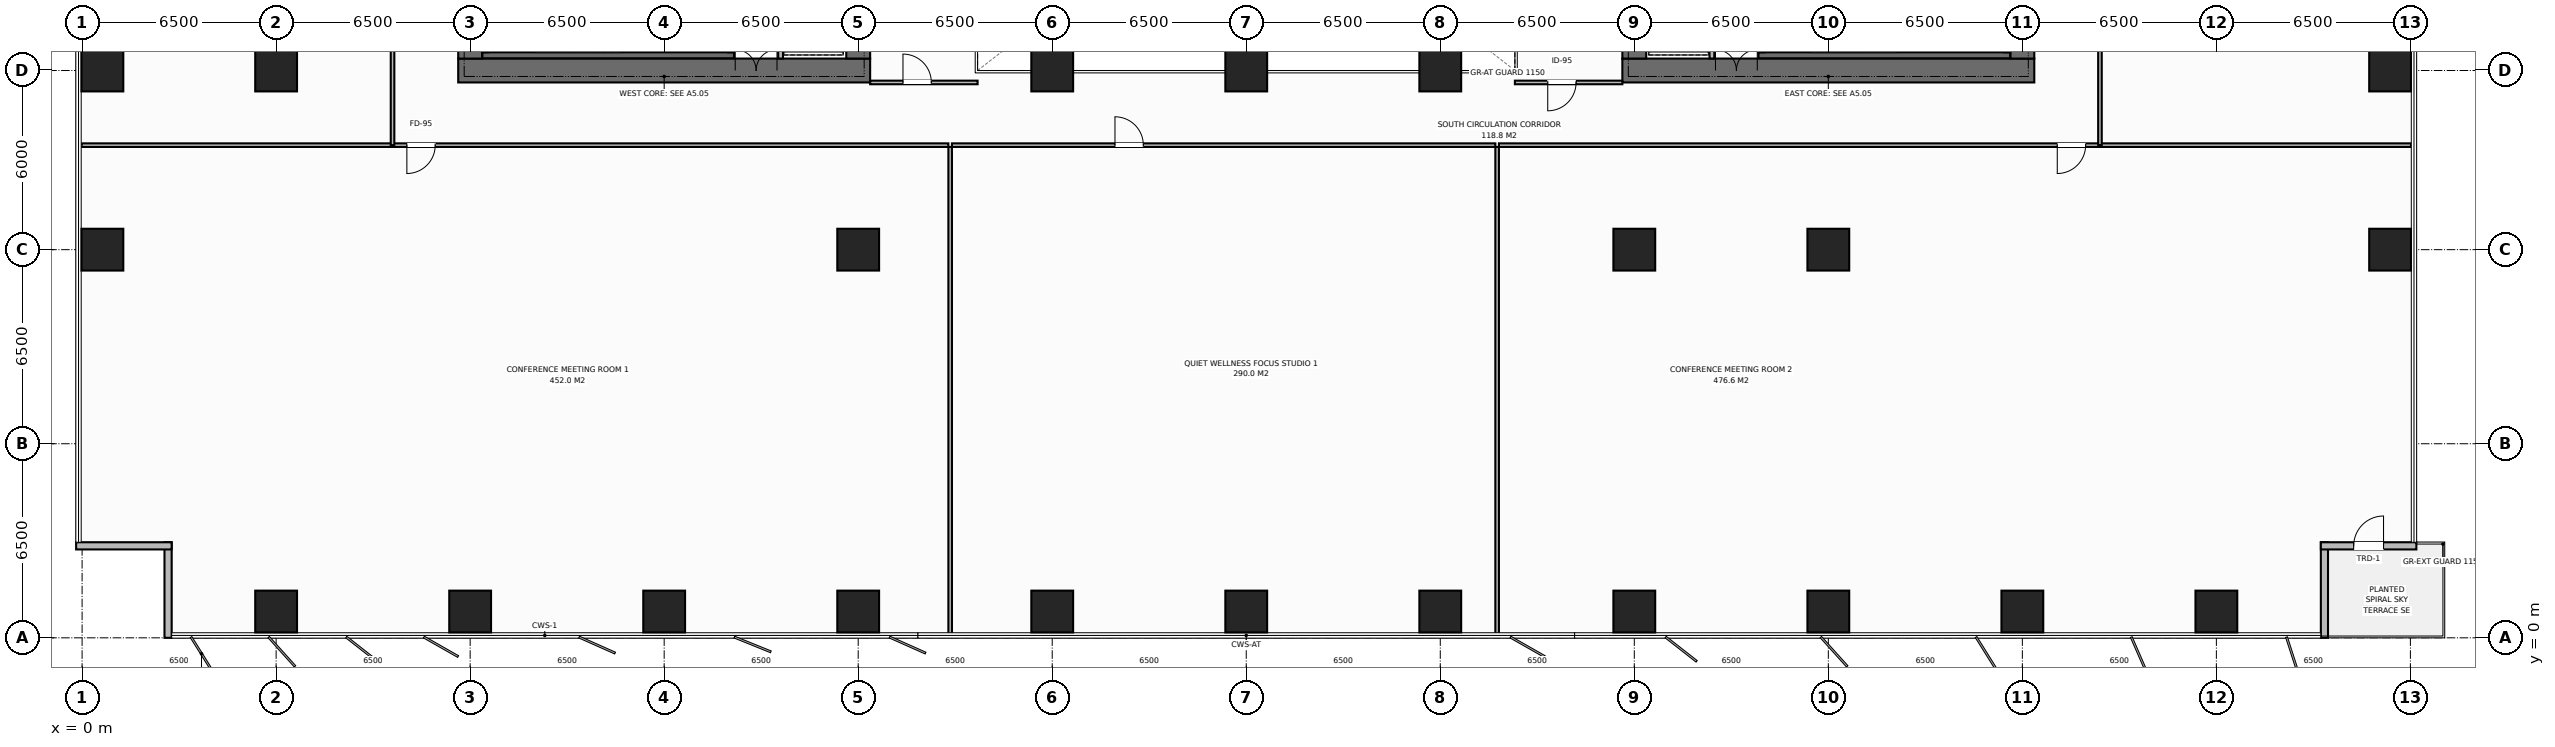
"""IFC4 building model, lengths in metres.
Left out: names, types, materials, properties, quantities, classifications, styles, units other than length and angle.
Written with IfcOpenShell. Run it as: python <this file> out.ifc"""

import sys

from ifc_helpers import new_model, si_unit, direction, frame, frame_2d, origin, origin_2d, place, context, subcontext, project, spatial, rectangle, extrude, element, fill, save


model = new_model("IFC4")
c1 = context("Model", 3, precision=1e-05, world=origin(), true_north=direction((0.0, 1.0)))
c2 = subcontext(c1, "Body", "Model", "MODEL_VIEW")
j1 = project(units=[si_unit("LENGTHUNIT", "METRE"), si_unit("PLANEANGLEUNIT", "RADIAN")], contexts=[c1])
p1 = place(None, origin())
s1 = spatial("IfcSite", under=j1, at=p1, CompositionType="ELEMENT")
p2 = place(p1, origin())
s2 = spatial("IfcBuilding", under=s1, at=p2, CompositionType="ELEMENT")
p3 = place(p2, frame((0.0, 0.0, 50.6)))
s3 = spatial("IfcBuildingStorey", under=s2, at=p3, CompositionType="ELEMENT", Elevation=50.6)
p4 = place(p3, frame((12.6, 19.0, 0.0), z_axis=(0.0, 0.0, 1.0), x_axis=(1.0, 0.0, 0.0)))
e1 = element("IfcWall", 1, at=p4, inside=s3, PredefinedType="SHEAR", context=c2, shape_type="SweptSolid", body=[
    extrude(rectangle(XDim=13.8, YDim=0.8, at=frame_2d((6.9, 0.0))), origin(), (0.0, 0.0, 1.0), 3.8),
])
p5 = place(p4, frame((9.28, 0.0, 0.0)))
e2 = element("IfcOpeningElement", 2, at=p5, cuts=e1, PredefinedType="OPENING", context=c2, shape_type="SweptSolid", body=[
    extrude(rectangle(XDim=1.4, YDim=2.2, at=frame_2d((0.7, 1.1))), frame((0.0, 0.41, 0.0), z_axis=(0.0, -1.0, 0.0), x_axis=(1.0, 0.0, 0.0)), (0.0, 0.0, 1.0), 0.82),
])
p6 = place(p3, frame((13.0, 19.4, 0.0), z_axis=(0.0, 0.0, 1.0), x_axis=(0.0, 1.0, 0.0)))
e3 = element("IfcWall", 3, at=p6, inside=s3, PredefinedType="SHEAR", context=c2, shape_type="SweptSolid", body=[
    extrude(rectangle(XDim=13.2, YDim=0.8, at=frame_2d((6.6, 0.0))), origin(), (0.0, 0.0, 1.0), 3.8),
])
p7 = place(p6, frame((4.65, 0.0, 0.0)))
e4 = element("IfcOpeningElement", 4, at=p7, cuts=e3, PredefinedType="OPENING", context=c2, shape_type="SweptSolid", body=[
    extrude(rectangle(XDim=1.4, YDim=2.2, at=frame_2d((0.7, 1.1))), frame((0.0, 0.41, 0.0), z_axis=(0.0, -1.0, 0.0), x_axis=(1.0, 0.0, 0.0)), (0.0, 0.0, 1.0), 0.82),
])
p8 = place(p3, frame((26.0, 19.4, 0.0), z_axis=(0.0, 0.0, 1.0), x_axis=(0.0, 1.0, 0.0)))
e5 = element("IfcWall", 5, at=p8, inside=s3, PredefinedType="SHEAR", context=c2, shape_type="SweptSolid", body=[
    extrude(rectangle(XDim=13.2, YDim=0.8, at=frame_2d((6.6, 0.0))), origin(), (0.0, 0.0, 1.0), 3.8),
])
p9 = place(p3, frame((51.6, 19.0, 0.0), z_axis=(0.0, 0.0, 1.0), x_axis=(1.0, 0.0, 0.0)))
e6 = element("IfcWall", 6, at=p9, inside=s3, PredefinedType="SHEAR", context=c2, shape_type="SweptSolid", body=[
    extrude(rectangle(XDim=13.8, YDim=0.8, at=frame_2d((6.9, 0.0))), origin(), (0.0, 0.0, 1.0), 3.8),
])
p10 = place(p9, frame((3.12, 0.0, 0.0)))
e7 = element("IfcOpeningElement", 7, at=p10, cuts=e6, PredefinedType="OPENING", context=c2, shape_type="SweptSolid", body=[
    extrude(rectangle(XDim=1.4, YDim=2.2, at=frame_2d((0.7, 1.1))), frame((0.0, 0.41, 0.0), z_axis=(0.0, -1.0, 0.0), x_axis=(1.0, 0.0, 0.0)), (0.0, 0.0, 1.0), 0.82),
])
p11 = place(p3, frame((52.0, 19.4, 0.0), z_axis=(0.0, 0.0, 1.0), x_axis=(0.0, 1.0, 0.0)))
e8 = element("IfcWall", 8, at=p11, inside=s3, PredefinedType="SHEAR", context=c2, shape_type="SweptSolid", body=[
    extrude(rectangle(XDim=13.2, YDim=0.8, at=frame_2d((6.6, 0.0))), origin(), (0.0, 0.0, 1.0), 3.8),
])
p12 = place(p3, frame((65.0, 19.4, 0.0), z_axis=(0.0, 0.0, 1.0), x_axis=(0.0, 1.0, 0.0)))
e9 = element("IfcWall", 9, at=p12, inside=s3, PredefinedType="SHEAR", context=c2, shape_type="SweptSolid", body=[
    extrude(rectangle(XDim=13.2, YDim=0.8, at=frame_2d((6.6, 0.0))), origin(), (0.0, 0.0, 1.0), 3.8),
])
p13 = place(p12, frame((8.05, 0.0, 0.0)))
e10 = element("IfcOpeningElement", 10, at=p13, cuts=e9, PredefinedType="OPENING", context=c2, shape_type="SweptSolid", body=[
    extrude(rectangle(XDim=1.3, YDim=2.2, at=frame_2d((0.65, 1.1))), frame((0.0, 0.41, 0.0), z_axis=(0.0, -1.0, 0.0), x_axis=(1.0, 0.0, 0.0)), (0.0, 0.0, 1.0), 0.82),
])
for number, where, z_axis, x_axis in (
    (11, (13.41, 19.51, 0.0), (0.0, 0.0, 1.0), (1.0, 0.0, 0.0)),
    (12, (56.16, 19.51, 0.0), (0.0, 0.0, 1.0), (1.0, 0.0, 0.0)),
):
    element("IfcWall", number, at=place(p3, frame(where, z_axis=z_axis, x_axis=x_axis)), inside=s3, PredefinedType="SHEAR", context=c2, shape_type="SweptSolid", body=[
        extrude(rectangle(XDim=8.43, YDim=0.2, at=frame_2d((4.215, 0.0))), origin(), (0.0, 0.0, 1.0), 3.8),
    ])
for number, where, z_axis, x_axis in (
    (13, (58.5, 13.0, 0.0), (0.0, 0.0, 1.0), (1.0, 0.0, 0.0)),
    (14, (6.5, 19.0, 0.0), (0.0, 0.0, 1.0), (1.0, 0.0, 0.0)),
    (15, (32.5, 19.0, 0.0), (0.0, 0.0, 1.0), (1.0, 0.0, 0.0)),
    (16, (39.0, 19.0, 0.0), (0.0, 0.0, 1.0), (1.0, 0.0, 0.0)),
    (17, (45.5, 19.0, 0.0), (0.0, 0.0, 1.0), (1.0, 0.0, 0.0)),
    (18, (26.0, 13.0, 0.0), (0.0, 0.0, 1.0), (1.0, 0.0, 0.0)),
    (19, (52.0, 13.0, 0.0), (0.0, 0.0, 1.0), (1.0, 0.0, 0.0)),
    (20, (6.5, 0.88, 0.0), (0.0, 0.0, 1.0), (1.0, 0.0, 0.0)),
    (21, (13.0, 0.88, 0.0), (0.0, 0.0, 1.0), (1.0, 0.0, 0.0)),
    (22, (19.5, 0.88, 0.0), (0.0, 0.0, 1.0), (1.0, 0.0, 0.0)),
    (23, (26.0, 0.88, 0.0), (0.0, 0.0, 1.0), (1.0, 0.0, 0.0)),
    (24, (32.5, 0.88, 0.0), (0.0, 0.0, 1.0), (1.0, 0.0, 0.0)),
    (25, (39.0, 0.88, 0.0), (0.0, 0.0, 1.0), (1.0, 0.0, 0.0)),
    (26, (45.5, 0.88, 0.0), (0.0, 0.0, 1.0), (1.0, 0.0, 0.0)),
    (27, (52.0, 0.88, 0.0), (0.0, 0.0, 1.0), (1.0, 0.0, 0.0)),
    (28, (58.5, 0.88, 0.0), (0.0, 0.0, 1.0), (1.0, 0.0, 0.0)),
    (29, (65.0, 0.88, 0.0), (0.0, 0.0, 1.0), (1.0, 0.0, 0.0)),
    (30, (71.5, 0.88, 0.0), (0.0, 0.0, 1.0), (1.0, 0.0, 0.0)),
    (31, (0.68, 13.0, 0.0), (0.0, 0.0, 1.0), (1.0, 0.0, 0.0)),
    (32, (77.32, 13.0, 0.0), (0.0, 0.0, 1.0), (1.0, 0.0, 0.0)),
    (33, (0.68, 19.0, 0.0), (0.0, 0.0, 1.0), (1.0, 0.0, 0.0)),
    (34, (77.32, 19.0, 0.0), (0.0, 0.0, 1.0), (1.0, 0.0, 0.0)),
):
    element("IfcColumn", number, at=place(p3, frame(where, z_axis=z_axis, x_axis=x_axis)), inside=s3, PredefinedType="COLUMN", context=c2, shape_type="SweptSolid", body=[
        extrude(rectangle(XDim=1.4, YDim=1.4, at=origin_2d()), origin(), (0.0, 0.0, 1.0), 3.8),
    ])
for number, where, z_axis, x_axis in (
    (35, (2.88, 0.0, 0.0), (0.0, 0.0, 1.0), (0.0, 1.0, 0.0)),
    (36, (3.0, 3.08, 0.0), (0.0, 0.0, 1.0), (-1.0, 0.0, 0.0)),
    (37, (75.12, 3.2, 0.0), (0.0, 0.0, 1.0), (0.0, -1.0, 0.0)),
):
    element("IfcWall", number, at=place(p3, frame(where, z_axis=z_axis, x_axis=x_axis)), inside=s3, PredefinedType="STANDARD", context=c2, shape_type="SweptSolid", body=[
        extrude(rectangle(XDim=3.2, YDim=0.24, at=frame_2d((1.6, 0.0))), origin(), (0.0, 0.0, 1.0), 3.55),
    ])
p14 = place(p3, frame((78.2, 3.08, 0.0), z_axis=(0.0, 0.0, 1.0), x_axis=(-1.0, 0.0, 0.0)))
e38 = element("IfcWall", 38, at=p14, inside=s3, PredefinedType="STANDARD", context=c2, shape_type="SweptSolid", body=[
    extrude(rectangle(XDim=3.2, YDim=0.24, at=frame_2d((1.6, 0.0))), origin(), (0.0, 0.0, 1.0), 3.55),
])
p15 = place(p14, frame((1.1, 0.0, 0.0)))
e39 = element("IfcOpeningElement", 39, at=p15, cuts=e38, PredefinedType="OPENING", context=c2, shape_type="SweptSolid", body=[
    extrude(rectangle(XDim=1.0, YDim=2.2, at=frame_2d((0.5, 1.1))), frame((0.0, 0.13, 0.0), z_axis=(0.0, -1.0, 0.0), x_axis=(1.0, 0.0, 0.0)), (0.0, 0.0, 1.0), 0.26),
])
p16 = place(p3, frame((23.4, 19.4, 0.0), z_axis=(0.0, 0.0, 1.0), x_axis=(0.0, 1.0, 0.0)))
e40 = element("IfcWall", 40, at=p16, inside=s3, PredefinedType="STANDARD", context=c2, shape_type="SweptSolid", body=[
    extrude(rectangle(XDim=13.2, YDim=0.16, at=frame_2d((6.6, 0.0))), origin(), (0.0, 0.0, 1.0), 3.55),
])
p17 = place(p16, frame((0.55, 0.0, 0.0)))
e41 = element("IfcOpeningElement", 41, at=p17, cuts=e40, PredefinedType="OPENING", context=c2, shape_type="SweptSolid", body=[
    extrude(rectangle(XDim=1.1, YDim=2.2, at=frame_2d((0.55, 1.1))), frame((0.0, 0.09, 0.0), z_axis=(0.0, -1.0, 0.0), x_axis=(1.0, 0.0, 0.0)), (0.0, 0.0, 1.0), 0.18),
])
p18 = place(p16, frame((2.7, 0.0, 0.0)))
e42 = element("IfcOpeningElement", 42, at=p18, cuts=e40, PredefinedType="OPENING", context=c2, shape_type="SweptSolid", body=[
    extrude(rectangle(XDim=1.1, YDim=2.2, at=frame_2d((0.55, 1.1))), frame((0.0, 0.09, 0.0), z_axis=(0.0, -1.0, 0.0), x_axis=(1.0, 0.0, 0.0)), (0.0, 0.0, 1.0), 0.18),
])
p19 = place(p3, frame((54.6, 19.4, 0.0), z_axis=(0.0, 0.0, 1.0), x_axis=(0.0, 1.0, 0.0)))
e43 = element("IfcWall", 43, at=p19, inside=s3, PredefinedType="STANDARD", context=c2, shape_type="SweptSolid", body=[
    extrude(rectangle(XDim=13.2, YDim=0.16, at=frame_2d((6.6, 0.0))), origin(), (0.0, 0.0, 1.0), 3.55),
])
p20 = place(p19, frame((0.55, 0.0, 0.0)))
e44 = element("IfcOpeningElement", 44, at=p20, cuts=e43, PredefinedType="OPENING", context=c2, shape_type="SweptSolid", body=[
    extrude(rectangle(XDim=1.1, YDim=2.2, at=frame_2d((0.55, 1.1))), frame((0.0, 0.09, 0.0), z_axis=(0.0, -1.0, 0.0), x_axis=(1.0, 0.0, 0.0)), (0.0, 0.0, 1.0), 0.18),
])
p21 = place(p19, frame((2.7, 0.0, 0.0)))
e45 = element("IfcOpeningElement", 45, at=p21, cuts=e43, PredefinedType="OPENING", context=c2, shape_type="SweptSolid", body=[
    extrude(rectangle(XDim=1.1, YDim=2.2, at=frame_2d((0.55, 1.1))), frame((0.0, 0.09, 0.0), z_axis=(0.0, -1.0, 0.0), x_axis=(1.0, 0.0, 0.0)), (0.0, 0.0, 1.0), 0.18),
])
p22 = place(p3, frame((26.4, 18.6, 0.0), z_axis=(0.0, 0.0, 1.0), x_axis=(1.0, 0.0, 0.0)))
e46 = element("IfcWall", 46, at=p22, inside=s3, PredefinedType="PARTITIONING", context=c2, shape_type="SweptSolid", body=[
    extrude(rectangle(XDim=3.6, YDim=0.12, at=frame_2d((1.8, 0.0))), origin(), (0.0, 0.0, 1.0), 3.55),
])
p23 = place(p22, frame((1.1, 0.0, 0.0)))
e47 = element("IfcOpeningElement", 47, at=p23, cuts=e46, PredefinedType="OPENING", context=c2, shape_type="SweptSolid", body=[
    extrude(rectangle(XDim=0.95, YDim=2.15, at=frame_2d((0.475, 1.075))), frame((0.0, 0.07, 0.0), z_axis=(0.0, -1.0, 0.0), x_axis=(1.0, 0.0, 0.0)), (0.0, 0.0, 1.0), 0.14),
])
p24 = place(p3, frame((48.0, 18.6, 0.0), z_axis=(0.0, 0.0, 1.0), x_axis=(1.0, 0.0, 0.0)))
e48 = element("IfcWall", 48, at=p24, inside=s3, PredefinedType="PARTITIONING", context=c2, shape_type="SweptSolid", body=[
    extrude(rectangle(XDim=3.6, YDim=0.12, at=frame_2d((1.8, 0.0))), origin(), (0.0, 0.0, 1.0), 3.55),
])
p25 = place(p24, frame((1.1, 0.0, 0.0)))
e49 = element("IfcOpeningElement", 49, at=p25, cuts=e48, PredefinedType="OPENING", context=c2, shape_type="SweptSolid", body=[
    extrude(rectangle(XDim=0.95, YDim=2.15, at=frame_2d((0.475, 1.075))), frame((0.0, 0.07, 0.0), z_axis=(0.0, -1.0, 0.0), x_axis=(1.0, 0.0, 0.0)), (0.0, 0.0, 1.0), 0.14),
])
p26 = place(p3, frame((29.081, 0.02, 0.0), z_axis=(0.0, 0.0, 1.0), x_axis=(0.0, 1.0, 0.0)))
e50 = element("IfcWall", 50, at=p26, inside=s3, PredefinedType="PARTITIONING", context=c2, shape_type="SweptSolid", body=[
    extrude(rectangle(XDim=16.42, YDim=0.12, at=frame_2d((8.21, 0.0))), origin(), (0.0, 0.0, 1.0), 3.55),
])
p27 = place(p3, frame((-0.02, 16.5, 0.0), z_axis=(0.0, 0.0, 1.0), x_axis=(1.0, 0.0, 0.0)))
e51 = element("IfcWall", 51, at=p27, inside=s3, PredefinedType="PARTITIONING", context=c2, shape_type="SweptSolid", body=[
    extrude(rectangle(XDim=29.041, YDim=0.12, at=frame_2d((14.521, 0.0))), origin(), (0.0, 0.0, 1.0), 3.55),
])
p28 = place(p27, frame((10.9, 0.0, 0.0)))
e52 = element("IfcOpeningElement", 52, at=p28, cuts=e51, PredefinedType="OPENING", context=c2, shape_type="SweptSolid", body=[
    extrude(rectangle(XDim=0.95, YDim=2.15, at=frame_2d((0.475, 1.075))), frame((0.0, 0.07, 0.0), z_axis=(0.0, -1.0, 0.0), x_axis=(1.0, 0.0, 0.0)), (0.0, 0.0, 1.0), 0.14),
])
p29 = place(p3, frame((47.405, 0.02, 0.0), z_axis=(0.0, 0.0, 1.0), x_axis=(0.0, 1.0, 0.0)))
e53 = element("IfcWall", 53, at=p29, inside=s3, PredefinedType="PARTITIONING", context=c2, shape_type="SweptSolid", body=[
    extrude(rectangle(XDim=16.42, YDim=0.12, at=frame_2d((8.21, 0.0))), origin(), (0.0, 0.0, 1.0), 3.55),
])
p30 = place(p3, frame((29.141, 16.5, 0.0), z_axis=(0.0, 0.0, 1.0), x_axis=(1.0, 0.0, 0.0)))
e54 = element("IfcWall", 54, at=p30, inside=s3, PredefinedType="PARTITIONING", context=c2, shape_type="SweptSolid", body=[
    extrude(rectangle(XDim=18.204, YDim=0.12, at=frame_2d((9.102, 0.0))), origin(), (0.0, 0.0, 1.0), 3.55),
])
p31 = place(p30, frame((5.461, 0.0, 0.0)))
e55 = element("IfcOpeningElement", 55, at=p31, cuts=e54, PredefinedType="OPENING", context=c2, shape_type="SweptSolid", body=[
    extrude(rectangle(XDim=0.95, YDim=2.15, at=frame_2d((0.475, 1.075))), frame((0.0, 0.07, 0.0), z_axis=(0.0, -1.0, 0.0), x_axis=(1.0, 0.0, 0.0)), (0.0, 0.0, 1.0), 0.14),
])
p32 = place(p3, frame((47.465, 16.5, 0.0), z_axis=(0.0, 0.0, 1.0), x_axis=(1.0, 0.0, 0.0)))
e56 = element("IfcWall", 56, at=p32, inside=s3, PredefinedType="PARTITIONING", context=c2, shape_type="SweptSolid", body=[
    extrude(rectangle(XDim=30.555, YDim=0.12, at=frame_2d((15.278, 0.0))), origin(), (0.0, 0.0, 1.0), 3.55),
])
p33 = place(p32, frame((18.705, 0.0, 0.0)))
e57 = element("IfcOpeningElement", 57, at=p33, cuts=e56, PredefinedType="OPENING", context=c2, shape_type="SweptSolid", body=[
    extrude(rectangle(XDim=0.95, YDim=2.15, at=frame_2d((0.475, 1.075))), frame((0.0, 0.07, 0.0), z_axis=(0.0, -1.0, 0.0), x_axis=(1.0, 0.0, 0.0)), (0.0, 0.0, 1.0), 0.14),
])
p34 = place(p3, frame((10.4, 16.5, 0.0), z_axis=(0.0, 0.0, 1.0), x_axis=(0.0, 1.0, 0.0)))
e58 = element("IfcWall", 58, at=p34, inside=s3, PredefinedType="PARTITIONING", context=c2, shape_type="SweptSolid", body=[
    extrude(rectangle(XDim=6.333, YDim=0.12, at=frame_2d((3.167, 0.0))), origin(), (0.0, 0.0, 1.0), 3.55),
])
p35 = place(p34, frame((3.742, 0.0, 0.0)))
e59 = element("IfcOpeningElement", 59, at=p35, cuts=e58, PredefinedType="OPENING", context=c2, shape_type="SweptSolid", body=[
    extrude(rectangle(XDim=0.95, YDim=2.15, at=frame_2d((0.475, 1.075))), frame((0.0, 0.07, 0.0), z_axis=(0.0, -1.0, 0.0), x_axis=(1.0, 0.0, 0.0)), (0.0, 0.0, 1.0), 0.14),
])
p36 = place(p3, frame((67.6, 16.5, 0.0), z_axis=(0.0, 0.0, 1.0), x_axis=(0.0, 1.0, 0.0)))
e60 = element("IfcWall", 60, at=p36, inside=s3, PredefinedType="PARTITIONING", context=c2, shape_type="SweptSolid", body=[
    extrude(rectangle(XDim=19.0, YDim=0.12, at=frame_2d((9.5, 0.0))), origin(), (0.0, 0.0, 1.0), 3.55),
])
p37 = place(p36, frame((9.025, 0.0, 0.0)))
e61 = element("IfcOpeningElement", 61, at=p37, cuts=e60, PredefinedType="OPENING", context=c2, shape_type="SweptSolid", body=[
    extrude(rectangle(XDim=0.95, YDim=2.15, at=frame_2d((0.475, 1.075))), frame((0.0, 0.07, 0.0), z_axis=(0.0, -1.0, 0.0), x_axis=(1.0, 0.0, 0.0)), (0.0, 0.0, 1.0), 0.14),
])
p38 = place(p15, origin())
e62 = element("IfcDoor", 62, at=p38, inside=s3, OperationType="SINGLE_SWING_RIGHT", PredefinedType="DOOR", context=c2, shape_type="SweptSolid", body=[
    extrude(rectangle(XDim=1.0, YDim=2.2, at=frame_2d((0.5, 1.1))), frame((0.0, 0.025, 0.0), z_axis=(0.0, -1.0, 0.0), x_axis=(1.0, 0.0, 0.0)), (0.0, 0.0, 1.0), 0.05),
])
fill(e39, e62)
p39 = place(p5, origin())
e63 = element("IfcDoor", 63, at=p39, inside=s3, OperationType="DOUBLE_DOOR_SINGLE_SWING", PredefinedType="DOOR", context=c2, shape_type="SweptSolid", body=[
    extrude(rectangle(XDim=1.4, YDim=2.2, at=frame_2d((0.7, 1.1))), frame((0.0, 0.125, 0.0), z_axis=(0.0, -1.0, 0.0), x_axis=(1.0, 0.0, 0.0)), (0.0, 0.0, 1.0), 0.05),
])
fill(e2, e63)
p40 = place(p10, origin())
e64 = element("IfcDoor", 64, at=p40, inside=s3, OperationType="DOUBLE_DOOR_SINGLE_SWING", PredefinedType="DOOR", context=c2, shape_type="SweptSolid", body=[
    extrude(rectangle(XDim=1.4, YDim=2.2, at=frame_2d((0.7, 1.1))), frame((0.0, 0.125, 0.0), z_axis=(0.0, -1.0, 0.0), x_axis=(1.0, 0.0, 0.0)), (0.0, 0.0, 1.0), 0.05),
])
fill(e7, e64)
p41 = place(p23, origin())
e65 = element("IfcDoor", 65, at=p41, inside=s3, OperationType="SINGLE_SWING_LEFT", PredefinedType="DOOR", context=c2, shape_type="SweptSolid", body=[
    extrude(rectangle(XDim=0.95, YDim=2.15, at=frame_2d((0.475, 1.075))), frame((0.0, 0.025, 0.0), z_axis=(0.0, -1.0, 0.0), x_axis=(1.0, 0.0, 0.0)), (0.0, 0.0, 1.0), 0.05),
])
fill(e47, e65)
p42 = place(p25, origin())
e66 = element("IfcDoor", 66, at=p42, inside=s3, OperationType="SINGLE_SWING_RIGHT", PredefinedType="DOOR", context=c2, shape_type="SweptSolid", body=[
    extrude(rectangle(XDim=0.95, YDim=2.15, at=frame_2d((0.475, 1.075))), frame((0.0, 0.025, 0.0), z_axis=(0.0, -1.0, 0.0), x_axis=(1.0, 0.0, 0.0)), (0.0, 0.0, 1.0), 0.05),
])
fill(e49, e66)
p43 = place(p28, origin())
e67 = element("IfcDoor", 67, at=p43, inside=s3, OperationType="SINGLE_SWING_RIGHT", PredefinedType="DOOR", context=c2, shape_type="SweptSolid", body=[
    extrude(rectangle(XDim=0.95, YDim=2.15, at=frame_2d((0.475, 1.075))), frame((0.0, 0.025, 0.0), z_axis=(0.0, -1.0, 0.0), x_axis=(1.0, 0.0, 0.0)), (0.0, 0.0, 1.0), 0.05),
])
fill(e52, e67)
p44 = place(p31, origin())
e68 = element("IfcDoor", 68, at=p44, inside=s3, OperationType="SINGLE_SWING_LEFT", PredefinedType="DOOR", context=c2, shape_type="SweptSolid", body=[
    extrude(rectangle(XDim=0.95, YDim=2.15, at=frame_2d((0.475, 1.075))), frame((0.0, 0.025, 0.0), z_axis=(0.0, -1.0, 0.0), x_axis=(1.0, 0.0, 0.0)), (0.0, 0.0, 1.0), 0.05),
])
fill(e55, e68)
p45 = place(p33, origin())
e69 = element("IfcDoor", 69, at=p45, inside=s3, OperationType="SINGLE_SWING_RIGHT", PredefinedType="DOOR", context=c2, shape_type="SweptSolid", body=[
    extrude(rectangle(XDim=0.95, YDim=2.15, at=frame_2d((0.475, 1.075))), frame((0.0, 0.025, 0.0), z_axis=(0.0, -1.0, 0.0), x_axis=(1.0, 0.0, 0.0)), (0.0, 0.0, 1.0), 0.05),
])
fill(e57, e69)
save(model, sys.argv[1])
